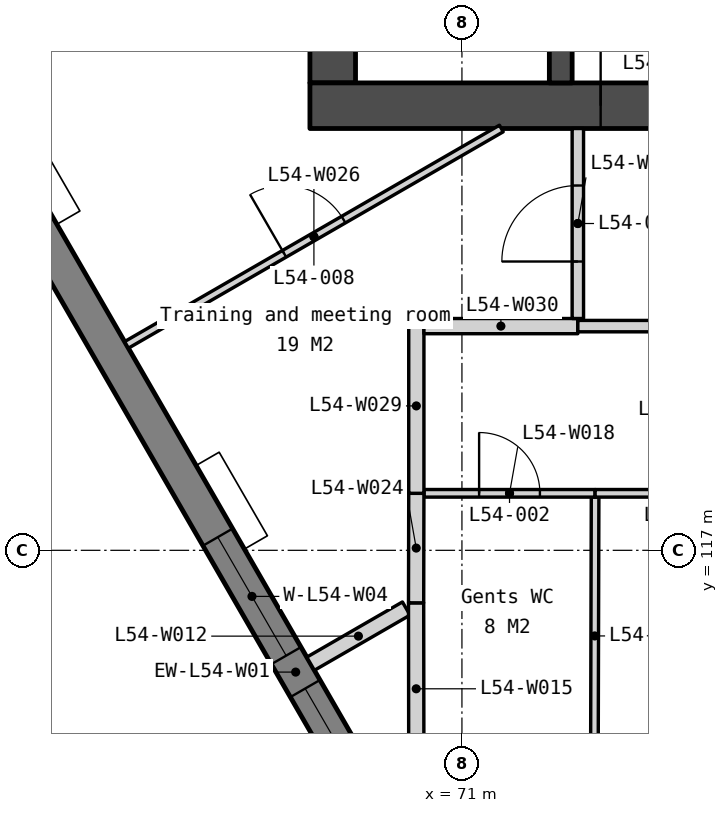
"""IFC4 building model, lengths in metres.
Left out: names, types, materials, properties, quantities, classifications, styles, units other than length and angle.
Written with IfcOpenShell. Run it as: python <this file> out.ifc"""

import sys

from ifc_helpers import new_model, si_unit, direction, frame, frame_2d, origin, place, context, subcontext, project, spatial, polyline, rectangle, outline, extrude, element, fill, save


model = new_model("IFC4")
c1 = context("Model", 3, precision=1e-05, world=origin(), true_north=direction((0.0, 1.0)))
c2 = subcontext(c1, "Body", "Model", "MODEL_VIEW")
j1 = project(units=[si_unit("LENGTHUNIT", "METRE"), si_unit("PLANEANGLEUNIT", "RADIAN")], contexts=[c1])
p1 = place(None, origin())
s1 = spatial("IfcSite", under=j1, at=p1, CompositionType="ELEMENT")
p2 = place(p1, origin())
s2 = spatial("IfcBuilding", under=s1, at=p2, CompositionType="ELEMENT")
p3 = place(p2, frame((0.0, 0.0, 215.3)))
s3 = spatial("IfcBuildingStorey", under=s2, at=p3, CompositionType="ELEMENT", Elevation=215.3)
p4 = place(p3, frame((69.3, 133.95, 0.0), z_axis=(0.0, 0.0, 1.0), x_axis=(0.0, -1.0, 0.0)))
e1 = element("IfcWall", 1, at=p4, inside=s3, PredefinedType="SOLIDWALL", context=c2, shape_type="SweptSolid", body=[
    extrude(rectangle(XDim=10.8, YDim=0.6, at=frame_2d((5.4, 0.0))), origin(), (0.0, 0.0, 1.0), 3.75),
])
p5 = place(p3, frame((69.0, 122.85, 0.0), z_axis=(0.0, 0.0, 1.0), x_axis=(1.0, 0.0, 0.0)))
e2 = element("IfcWall", 2, at=p5, inside=s3, PredefinedType="SOLIDWALL", context=c2, shape_type="SweptSolid", body=[
    extrude(rectangle(XDim=22.0, YDim=0.6, at=frame_2d((11.0, 0.0))), origin(), (0.0, 0.0, 1.0), 3.75),
])
p6 = place(p5, frame((16.375, 0.0, 0.0)))
e3 = element("IfcOpeningElement", 3, at=p6, cuts=e2, PredefinedType="OPENING", context=c2, shape_type="SweptSolid", body=[
    extrude(rectangle(XDim=1.8, YDim=2.1, at=frame_2d((0.9, 1.05))), frame((0.0, 0.31, 0.0), z_axis=(0.0, -1.0, 0.0), x_axis=(1.0, 0.0, 0.0)), (0.0, 0.0, 1.0), 0.62),
])
p7 = place(p5, frame((3.825, 0.0, 0.0)))
e4 = element("IfcOpeningElement", 4, at=p7, cuts=e2, PredefinedType="OPENING", context=c2, shape_type="SweptSolid", body=[
    extrude(rectangle(XDim=1.8, YDim=2.1, at=frame_2d((0.9, 1.05))), frame((0.0, 0.31, 0.0), z_axis=(0.0, -1.0, 0.0), x_axis=(1.0, 0.0, 0.0)), (0.0, 0.0, 1.0), 0.62),
])
p8 = place(p5, frame((12.85, 0.0, 0.0)))
e5 = element("IfcOpeningElement", 5, at=p8, cuts=e2, PredefinedType="OPENING", context=c2, shape_type="SweptSolid", body=[
    extrude(rectangle(XDim=1.5, YDim=2.1, at=frame_2d((0.75, 1.05))), frame((0.0, 0.31, 0.0), z_axis=(0.0, -1.0, 0.0), x_axis=(1.0, 0.0, 0.0)), (0.0, 0.0, 1.0), 0.62),
])
p9 = place(p3, frame((72.3, 133.95, 0.0), z_axis=(0.0, 0.0, 1.0), x_axis=(0.0, -1.0, 0.0)))
e6 = element("IfcWall", 6, at=p9, inside=s3, PredefinedType="SOLIDWALL", context=c2, shape_type="SweptSolid", body=[
    extrude(rectangle(XDim=10.8, YDim=0.3, at=frame_2d((5.4, 0.0))), origin(), (0.0, 0.0, 1.0), 3.75),
])
p10 = place(p9, frame((6.95, 0.0, 0.0)))
e7 = element("IfcOpeningElement", 7, at=p10, cuts=e6, PredefinedType="OPENING", context=c2, shape_type="SweptSolid", body=[
    extrude(rectangle(XDim=1.1, YDim=2.1, at=frame_2d((0.55, 1.05))), frame((0.0, 0.16, 0.0), z_axis=(0.0, -1.0, 0.0), x_axis=(1.0, 0.0, 0.0)), (0.0, 0.0, 1.0), 0.32),
])
p11 = place(p9, frame((9.35, 0.0, 0.0)))
e8 = element("IfcOpeningElement", 8, at=p11, cuts=e6, PredefinedType="OPENING", context=c2, shape_type="SweptSolid", body=[
    extrude(rectangle(XDim=0.9, YDim=2.1, at=frame_2d((0.45, 1.05))), frame((0.0, 0.16, 0.0), z_axis=(0.0, -1.0, 0.0), x_axis=(1.0, 0.0, 0.0)), (0.0, 0.0, 1.0), 0.32),
])
p12 = place(p9, frame((5.1, 0.0, 0.0)))
e9 = element("IfcOpeningElement", 9, at=p12, cuts=e6, PredefinedType="OPENING", context=c2, shape_type="SweptSolid", body=[
    extrude(rectangle(XDim=1.0, YDim=2.1, at=frame_2d((0.5, 1.05))), frame((0.0, 0.16, 0.0), z_axis=(0.0, -1.0, 0.0), x_axis=(1.0, 0.0, 0.0)), (0.0, 0.0, 1.0), 0.32),
])
p13 = place(p3, frame((59.13, 132.168, -0.15), z_axis=(0.0, 0.0, 1.0), x_axis=(0.500002199942, -0.866024133644, 0.0)))
e10 = element("IfcWall", 10, at=p13, inside=s3, PredefinedType="SOLIDWALL", context=c2, shape_type="SweptSolid", body=[
    extrude(outline(polyline([(38.729, 0.0), (38.729, 3.9), (0.0, 3.9), (0.0, 0.0), (38.729, 0.0)])), frame((0.0, 0.225, 0.0), z_axis=(0.0, -1.0, 0.0), x_axis=(1.0, 0.0, 0.0)), (0.0, 0.0, 1.0), 0.45),
])
p14 = place(p13, frame((0.776, 0.0, 0.95)))
e11 = element("IfcOpeningElement", 11, at=p14, cuts=e10, PredefinedType="OPENING", context=c2, shape_type="SweptSolid", body=[
    extrude(rectangle(XDim=1.2, YDim=2.2, at=frame_2d((0.6, 1.1))), frame((0.0, 0.235, 0.0), z_axis=(0.0, -1.0, 0.0), x_axis=(1.0, 0.0, 0.0)), (0.0, 0.0, 1.0), 0.47),
])
p15 = place(p13, frame((7.632, 0.0, 0.95)))
e12 = element("IfcOpeningElement", 12, at=p15, cuts=e10, PredefinedType="OPENING", context=c2, shape_type="SweptSolid", body=[
    extrude(rectangle(XDim=1.8, YDim=2.2, at=frame_2d((0.9, 1.1))), frame((0.0, 0.235, 0.0), z_axis=(0.0, -1.0, 0.0), x_axis=(1.0, 0.0, 0.0)), (0.0, 0.0, 1.0), 0.47),
])
p16 = place(p13, frame((9.932, 0.0, 0.95)))
e13 = element("IfcOpeningElement", 13, at=p16, cuts=e10, PredefinedType="OPENING", context=c2, shape_type="SweptSolid", body=[
    extrude(rectangle(XDim=1.8, YDim=2.2, at=frame_2d((0.9, 1.1))), frame((0.0, 0.235, 0.0), z_axis=(0.0, -1.0, 0.0), x_axis=(1.0, 0.0, 0.0)), (0.0, 0.0, 1.0), 0.47),
])
p17 = place(p13, frame((17.315, 0.0, 0.95)))
e14 = element("IfcOpeningElement", 14, at=p17, cuts=e10, PredefinedType="OPENING", context=c2, shape_type="SweptSolid", body=[
    extrude(rectangle(XDim=1.8, YDim=2.2, at=frame_2d((0.9, 1.1))), frame((0.0, 0.235, 0.0), z_axis=(0.0, -1.0, 0.0), x_axis=(1.0, 0.0, 0.0)), (0.0, 0.0, 1.0), 0.47),
])
p18 = place(p13, frame((19.615, 0.0, 0.95)))
e15 = element("IfcOpeningElement", 15, at=p18, cuts=e10, PredefinedType="OPENING", context=c2, shape_type="SweptSolid", body=[
    extrude(rectangle(XDim=1.8, YDim=2.2, at=frame_2d((0.9, 1.1))), frame((0.0, 0.235, 0.0), z_axis=(0.0, -1.0, 0.0), x_axis=(1.0, 0.0, 0.0)), (0.0, 0.0, 1.0), 0.47),
])
p19 = place(p13, frame((26.997, 0.0, 0.95)))
e16 = element("IfcOpeningElement", 16, at=p19, cuts=e10, PredefinedType="OPENING", context=c2, shape_type="SweptSolid", body=[
    extrude(rectangle(XDim=1.8, YDim=2.2, at=frame_2d((0.9, 1.1))), frame((0.0, 0.235, 0.0), z_axis=(0.0, -1.0, 0.0), x_axis=(1.0, 0.0, 0.0)), (0.0, 0.0, 1.0), 0.47),
])
p20 = place(p13, frame((29.297, 0.0, 0.95)))
e17 = element("IfcOpeningElement", 17, at=p20, cuts=e10, PredefinedType="OPENING", context=c2, shape_type="SweptSolid", body=[
    extrude(rectangle(XDim=1.8, YDim=2.2, at=frame_2d((0.9, 1.1))), frame((0.0, 0.235, 0.0), z_axis=(0.0, -1.0, 0.0), x_axis=(1.0, 0.0, 0.0)), (0.0, 0.0, 1.0), 0.47),
])
p21 = place(p13, frame((36.753, 0.0, 0.95)))
e18 = element("IfcOpeningElement", 18, at=p21, cuts=e10, PredefinedType="OPENING", context=c2, shape_type="SweptSolid", body=[
    extrude(rectangle(XDim=1.2, YDim=2.2, at=frame_2d((0.6, 1.1))), frame((0.0, 0.235, 0.0), z_axis=(0.0, -1.0, 0.0), x_axis=(1.0, 0.0, 0.0)), (0.0, 0.0, 1.0), 0.47),
])
p22 = place(p3, frame((69.009, 115.508, 0.0), z_axis=(0.0, 0.0, 1.0), x_axis=(0.865958882005, 0.500115201406, 0.0)))
e19 = element("IfcWall", 19, at=p22, inside=s3, PredefinedType="PARTITIONING", context=c2, shape_type="SweptSolid", body=[
    extrude(rectangle(XDim=1.453, YDim=0.2, at=frame_2d((0.727, 0.0))), origin(), (0.0, 0.0, 1.0), 3.75),
])
p23 = place(p3, frame((70.4, 114.047, 0.0), z_axis=(0.0, 0.0, 1.0), x_axis=(-0.001295195892, 0.999999161233, 0.0)))
e20 = element("IfcWall", 20, at=p23, inside=s3, PredefinedType="PARTITIONING", context=c2, shape_type="SweptSolid", body=[
    extrude(rectangle(XDim=2.262, YDim=0.2, at=frame_2d((1.131, 0.0))), origin(), (0.0, 0.0, 1.0), 3.75),
])
p24 = place(p3, frame((72.742, 114.047, 0.0), z_axis=(0.0, 0.0, 1.0), x_axis=(0.002673429826, 0.99999642638, 0.0)))
e21 = element("IfcWall", 21, at=p24, inside=s3, PredefinedType="PARTITIONING", context=c2, shape_type="SweptSolid", body=[
    extrude(rectangle(XDim=3.653, YDim=0.1, at=frame_2d((1.826, 0.0))), origin(), (0.0, 0.0, 1.0), 3.75),
])
p25 = place(p3, frame((70.5, 117.75, 0.0), z_axis=(0.0, 0.0, 1.0), x_axis=(1.0, 0.0, 0.0)))
e22 = element("IfcWall", 22, at=p25, inside=s3, PredefinedType="PARTITIONING", context=c2, shape_type="SweptSolid", body=[
    extrude(rectangle(XDim=2.252, YDim=0.1, at=frame_2d((1.126, 0.0))), origin(), (0.0, 0.0, 1.0), 3.75),
])
p26 = place(p25, frame((0.726, 0.0, 0.0)))
e23 = element("IfcOpeningElement", 23, at=p26, cuts=e22, PredefinedType="OPENING", context=c2, shape_type="SweptSolid", body=[
    extrude(rectangle(XDim=0.8, YDim=2.1, at=frame_2d((0.4, 1.05))), frame((0.0, 0.06, 0.0), z_axis=(0.0, -1.0, 0.0), x_axis=(1.0, 0.0, 0.0)), (0.0, 0.0, 1.0), 0.12),
])
p27 = place(p3, frame((72.752, 117.75, 0.0), z_axis=(0.0, 0.0, 1.0), x_axis=(1.0, 0.0, 0.0)))
e24 = element("IfcWall", 24, at=p27, inside=s3, PredefinedType="PARTITIONING", context=c2, shape_type="SweptSolid", body=[
    extrude(rectangle(XDim=2.352, YDim=0.1, at=frame_2d((1.176, 0.0))), origin(), (0.0, 0.0, 1.0), 3.75),
])
p28 = place(p27, frame((0.776, 0.0, 0.0)))
e25 = element("IfcOpeningElement", 25, at=p28, cuts=e24, PredefinedType="OPENING", context=c2, shape_type="SweptSolid", body=[
    extrude(rectangle(XDim=0.8, YDim=2.1, at=frame_2d((0.4, 1.05))), frame((0.0, 0.06, 0.0), z_axis=(0.0, -1.0, 0.0), x_axis=(1.0, 0.0, 0.0)), (0.0, 0.0, 1.0), 0.12),
])
p29 = place(p3, frame((70.397, 116.309, 0.0), z_axis=(0.0, 0.0, 1.0), x_axis=(0.002033204879, 0.999997933037, 0.0)))
e26 = element("IfcWall", 26, at=p29, inside=s3, PredefinedType="PARTITIONING", context=c2, shape_type="SweptSolid", body=[
    extrude(rectangle(XDim=1.441, YDim=0.2, at=frame_2d((0.72, 0.0))), origin(), (0.0, 0.0, 1.0), 3.75),
])
p30 = place(p3, frame((66.587, 119.703, 0.0), z_axis=(0.0, 0.0, 1.0), x_axis=(0.866023511746, 0.500003277092, 0.0)))
e27 = element("IfcWall", 27, at=p30, inside=s3, PredefinedType="PARTITIONING", context=c2, shape_type="SweptSolid", body=[
    extrude(rectangle(XDim=5.694, YDim=0.1, at=frame_2d((2.847, 0.0))), origin(), (0.0, 0.0, 1.0), 3.75),
])
p31 = place(p30, frame((2.397, 0.0, 0.0)))
e28 = element("IfcOpeningElement", 28, at=p31, cuts=e27, PredefinedType="OPENING", context=c2, shape_type="SweptSolid", body=[
    extrude(rectangle(XDim=0.9, YDim=2.1, at=frame_2d((0.45, 1.05))), frame((0.0, 0.06, 0.0), z_axis=(0.0, -1.0, 0.0), x_axis=(1.0, 0.0, 0.0)), (0.0, 0.0, 1.0), 0.12),
])
p32 = place(p3, frame((70.4, 117.75, 0.0), z_axis=(0.0, 0.0, 1.0), x_axis=(0.0, 1.0, 0.0)))
e29 = element("IfcWall", 29, at=p32, inside=s3, PredefinedType="PARTITIONING", context=c2, shape_type="SweptSolid", body=[
    extrude(rectangle(XDim=2.3, YDim=0.2, at=frame_2d((1.15, 0.0))), origin(), (0.0, 0.0, 1.0), 3.75),
])
p33 = place(p3, frame((70.5, 119.95, 0.0), z_axis=(0.0, 0.0, 1.0), x_axis=(1.0, 0.0, 0.0)))
e30 = element("IfcWall", 30, at=p33, inside=s3, PredefinedType="PARTITIONING", context=c2, shape_type="SweptSolid", body=[
    extrude(rectangle(XDim=2.025, YDim=0.2, at=frame_2d((1.012, 0.0))), origin(), (0.0, 0.0, 1.0), 3.75),
])
p34 = place(p3, frame((72.525, 120.05, 0.0), z_axis=(0.0, 0.0, 1.0), x_axis=(0.0, 1.0, 0.0)))
e31 = element("IfcWall", 31, at=p34, inside=s3, PredefinedType="PARTITIONING", context=c2, shape_type="SweptSolid", body=[
    extrude(rectangle(XDim=2.5, YDim=0.15, at=frame_2d((1.25, 0.0))), origin(), (0.0, 0.0, 1.0), 3.75),
])
p35 = place(p34, frame((0.75, 0.0, 0.0)))
e32 = element("IfcOpeningElement", 32, at=p35, cuts=e31, PredefinedType="OPENING", context=c2, shape_type="SweptSolid", body=[
    extrude(rectangle(XDim=1.0, YDim=2.1, at=frame_2d((0.5, 1.05))), frame((0.0, 0.085, 0.0), z_axis=(0.0, -1.0, 0.0), x_axis=(1.0, 0.0, 0.0)), (0.0, 0.0, 1.0), 0.17),
])
p36 = place(p3, frame((72.525, 119.95, 0.0), z_axis=(0.0, 0.0, 1.0), x_axis=(0.999999950384, -0.000315010222, 0.0)))
e33 = element("IfcWall", 33, at=p36, inside=s3, PredefinedType="PARTITIONING", context=c2, shape_type="SweptSolid", body=[
    extrude(rectangle(XDim=6.2, YDim=0.15, at=frame_2d((3.1, 0.0))), origin(), (0.0, 0.0, 1.0), 3.75),
])
p37 = place(p36, frame((2.6, 0.0, 0.0)))
e34 = element("IfcOpeningElement", 34, at=p37, cuts=e33, PredefinedType="OPENING", context=c2, shape_type="SweptSolid", body=[
    extrude(rectangle(XDim=1.0, YDim=2.1, at=frame_2d((0.5, 1.05))), frame((0.0, 0.085, 0.0), z_axis=(0.0, -1.0, 0.0), x_axis=(1.0, 0.0, 0.0)), (0.0, 0.0, 1.0), 0.17),
])
p38 = place(p7, origin())
e35 = element("IfcDoor", 35, at=p38, inside=s3, OperationType="DOUBLE_DOOR_DOUBLE_SWING", PredefinedType="DOOR", context=c2, shape_type="SweptSolid", body=[
    extrude(rectangle(XDim=1.8, YDim=2.1, at=frame_2d((0.9, 1.05))), frame((0.0, 0.025, 0.0), z_axis=(0.0, -1.0, 0.0), x_axis=(1.0, 0.0, 0.0)), (0.0, 0.0, 1.0), 0.05),
])
fill(e4, e35)
p39 = place(p17, origin())
e36 = element("IfcWindow", 36, at=p39, inside=s3, PartitioningType="SINGLE_PANEL", PredefinedType="WINDOW", context=c2, shape_type="SweptSolid", body=[
    extrude(rectangle(XDim=1.8, YDim=2.2, at=frame_2d((0.9, 1.1))), frame((0.0, 0.03, 0.0), z_axis=(0.0, -1.0, 0.0), x_axis=(1.0, 0.0, 0.0)), (0.0, 0.0, 1.0), 0.06),
])
fill(e14, e36)
p40 = place(p18, origin())
e37 = element("IfcWindow", 37, at=p40, inside=s3, PartitioningType="SINGLE_PANEL", PredefinedType="WINDOW", context=c2, shape_type="SweptSolid", body=[
    extrude(rectangle(XDim=1.8, YDim=2.2, at=frame_2d((0.9, 1.1))), frame((0.0, 0.03, 0.0), z_axis=(0.0, -1.0, 0.0), x_axis=(1.0, 0.0, 0.0)), (0.0, 0.0, 1.0), 0.06),
])
fill(e15, e37)
p41 = place(p26, origin())
e38 = element("IfcDoor", 38, at=p41, inside=s3, OperationType="SINGLE_SWING_LEFT", PredefinedType="DOOR", context=c2, shape_type="SweptSolid", body=[
    extrude(rectangle(XDim=0.8, YDim=2.1, at=frame_2d((0.4, 1.05))), frame((0.0, 0.025, 0.0), z_axis=(0.0, -1.0, 0.0), x_axis=(1.0, 0.0, 0.0)), (0.0, 0.0, 1.0), 0.05),
])
fill(e23, e38)
p42 = place(p31, origin())
e39 = element("IfcDoor", 39, at=p42, inside=s3, OperationType="SINGLE_SWING_LEFT", PredefinedType="DOOR", context=c2, shape_type="SweptSolid", body=[
    extrude(rectangle(XDim=0.9, YDim=2.1, at=frame_2d((0.45, 1.05))), frame((0.0, 0.025, 0.0), z_axis=(0.0, -1.0, 0.0), x_axis=(1.0, 0.0, 0.0)), (0.0, 0.0, 1.0), 0.05),
])
fill(e28, e39)
p43 = place(p35, origin())
e40 = element("IfcDoor", 40, at=p43, inside=s3, OperationType="SINGLE_SWING_LEFT", PredefinedType="DOOR", context=c2, shape_type="SweptSolid", body=[
    extrude(rectangle(XDim=1.0, YDim=2.1, at=frame_2d((0.5, 1.05))), frame((0.0, 0.025, 0.0), z_axis=(0.0, -1.0, 0.0), x_axis=(1.0, 0.0, 0.0)), (0.0, 0.0, 1.0), 0.05),
])
fill(e32, e40)
save(model, sys.argv[1])
